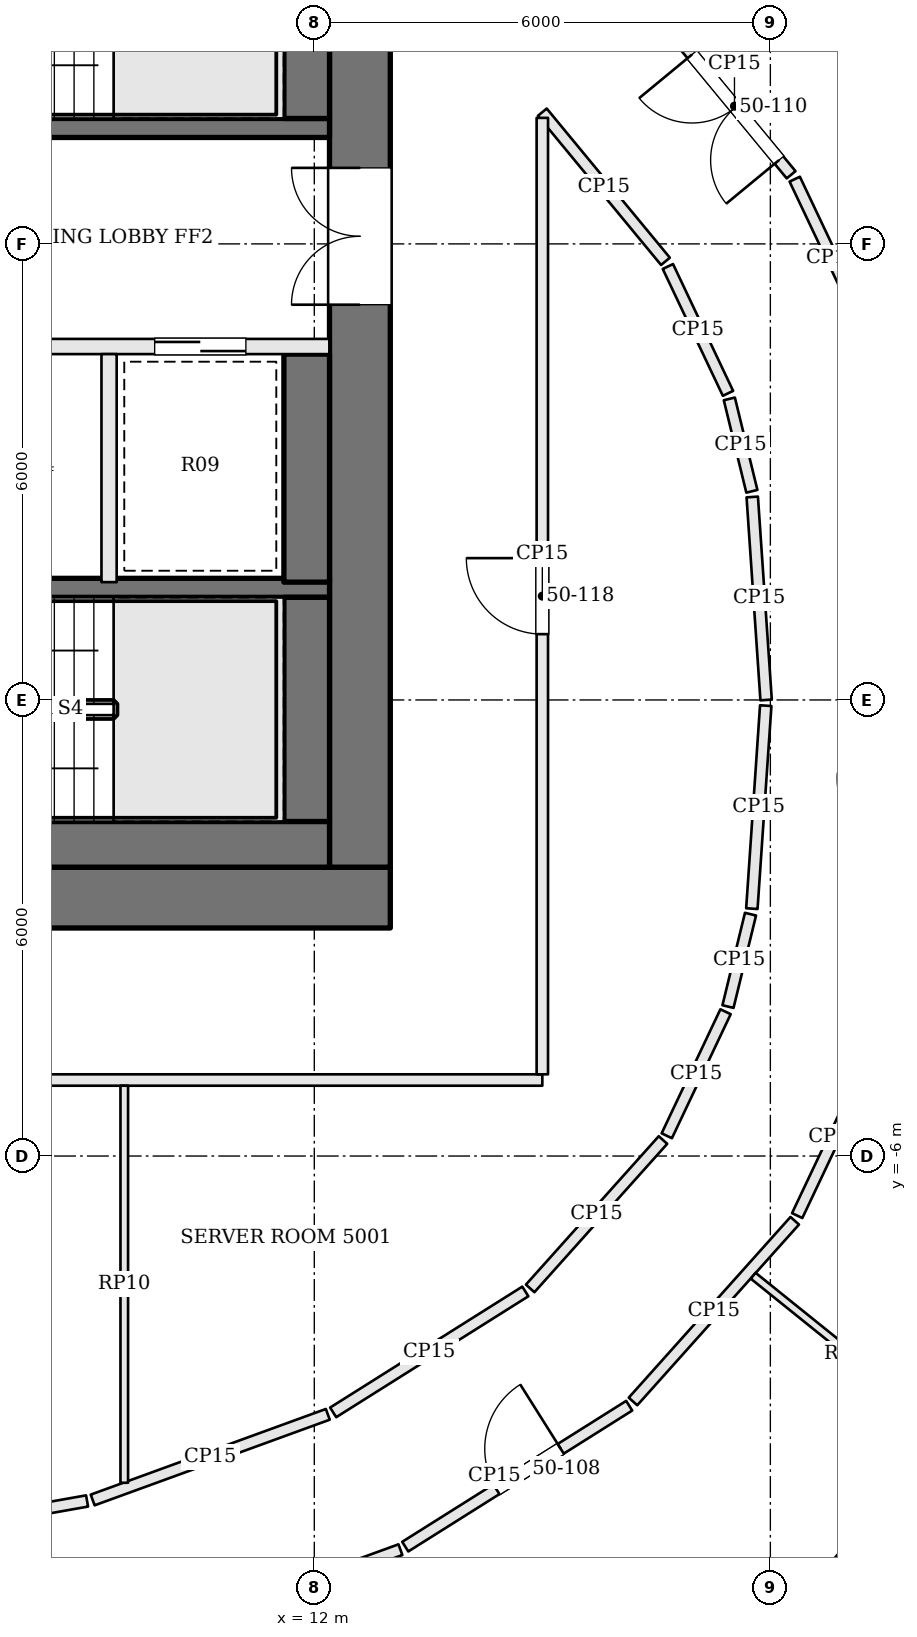
"""IFC4 building model, lengths in metres.
Left out: names, types, materials, properties, quantities, classifications, styles, units other than length and angle.
Written with IfcOpenShell. Run it as: python <this file> out.ifc"""

import sys

from ifc_helpers import new_model, si_unit, direction, frame, frame_2d, origin, place, context, subcontext, project, spatial, rectangle, extrude, element, fill, save


model = new_model("IFC4")
c1 = context("Model", 3, precision=1e-05, world=origin(), true_north=direction((0.0, 1.0)))
c2 = subcontext(c1, "Body", "Model", "MODEL_VIEW")
j1 = project(units=[si_unit("LENGTHUNIT", "METRE"), si_unit("PLANEANGLEUNIT", "RADIAN")], contexts=[c1])
p1 = place(None, origin())
s1 = spatial("IfcSite", under=j1, at=p1, CompositionType="ELEMENT")
p2 = place(p1, origin())
s2 = spatial("IfcBuilding", under=s1, at=p2, CompositionType="ELEMENT")
p3 = place(p2, frame((0.0, 0.0, 205.2)))
s3 = spatial("IfcBuildingStorey", under=s2, at=p3, CompositionType="ELEMENT", Elevation=205.2)
p4 = place(p3, frame((-13.0, -2.6, 0.0), z_axis=(0.0, 0.0, 1.0), x_axis=(1.0, 0.0, 0.0)))
e1 = element("IfcWall", 1, at=p4, inside=s3, PredefinedType="SHEAR", context=c2, shape_type="SweptSolid", body=[
    extrude(rectangle(XDim=26.0, YDim=0.8, at=frame_2d((13.0, 0.0))), origin(), (0.0, 0.0, 1.0), 3.9),
])
p5 = place(p4, frame((8.925, 0.0, 0.0)))
e2 = element("IfcOpeningElement", 2, at=p5, cuts=e1, PredefinedType="OPENING", context=c2, shape_type="SweptSolid", body=[
    extrude(rectangle(XDim=0.9, YDim=2.1, at=frame_2d((0.45, 1.05))), frame((0.0, 0.41, 0.0), z_axis=(0.0, -1.0, 0.0), x_axis=(1.0, 0.0, 0.0)), (0.0, 0.0, 1.0), 0.82),
])
p6 = place(p4, frame((11.475, 0.0, 0.0)))
e3 = element("IfcOpeningElement", 3, at=p6, cuts=e1, PredefinedType="OPENING", context=c2, shape_type="SweptSolid", body=[
    extrude(rectangle(XDim=0.9, YDim=2.1, at=frame_2d((0.45, 1.05))), frame((0.0, 0.41, 0.0), z_axis=(0.0, -1.0, 0.0), x_axis=(1.0, 0.0, 0.0)), (0.0, 0.0, 1.0), 0.82),
])
p7 = place(p4, frame((13.6, 0.0, 0.0)))
e4 = element("IfcOpeningElement", 4, at=p7, cuts=e1, PredefinedType="OPENING", context=c2, shape_type="SweptSolid", body=[
    extrude(rectangle(XDim=1.0, YDim=2.1, at=frame_2d((0.5, 1.05))), frame((0.0, 0.41, 0.0), z_axis=(0.0, -1.0, 0.0), x_axis=(1.0, 0.0, 0.0)), (0.0, 0.0, 1.0), 0.82),
])
p8 = place(p4, frame((15.95, 0.0, 0.0)))
e5 = element("IfcOpeningElement", 5, at=p8, cuts=e1, PredefinedType="OPENING", context=c2, shape_type="SweptSolid", body=[
    extrude(rectangle(XDim=1.0, YDim=2.1, at=frame_2d((0.5, 1.05))), frame((0.0, 0.41, 0.0), z_axis=(0.0, -1.0, 0.0), x_axis=(1.0, 0.0, 0.0)), (0.0, 0.0, 1.0), 0.82),
])
p9 = place(p3, frame((12.6, -2.2, 0.0), z_axis=(0.0, 0.0, 1.0), x_axis=(0.0, 1.0, 0.0)))
e6 = element("IfcWall", 6, at=p9, inside=s3, PredefinedType="SHEAR", context=c2, shape_type="SweptSolid", body=[
    extrude(rectangle(XDim=13.4, YDim=0.8, at=frame_2d((6.7, 0.0))), origin(), (0.0, 0.0, 1.0), 3.9),
])
p10 = place(p9, frame((7.4, 0.0, 0.0)))
e7 = element("IfcOpeningElement", 7, at=p10, cuts=e6, PredefinedType="OPENING", context=c2, shape_type="SweptSolid", body=[
    extrude(rectangle(XDim=1.8, YDim=2.1, at=frame_2d((0.9, 1.05))), frame((0.0, 0.41, 0.0), z_axis=(0.0, -1.0, 0.0), x_axis=(1.0, 0.0, 0.0)), (0.0, 0.0, 1.0), 0.82),
])
p11 = place(p3, frame((12.2, 7.525, 0.0), z_axis=(0.0, 0.0, 1.0), x_axis=(-1.0, 0.0, 0.0)))
e8 = element("IfcWall", 8, at=p11, inside=s3, PredefinedType="SOLIDWALL", context=c2, shape_type="SweptSolid", body=[
    extrude(rectangle(XDim=7.1, YDim=0.25, at=frame_2d((3.55, 0.0))), origin(), (0.0, 0.0, 1.0), 3.7),
])
p12 = place(p11, frame((5.8, 0.0, 0.0)))
e9 = element("IfcOpeningElement", 9, at=p12, cuts=e8, PredefinedType="OPENING", context=c2, shape_type="SweptSolid", body=[
    extrude(rectangle(XDim=1.2, YDim=2.1, at=frame_2d((0.6, 1.05))), frame((0.0, 0.135, 0.0), z_axis=(0.0, -1.0, 0.0), x_axis=(1.0, 0.0, 0.0)), (0.0, 0.0, 1.0), 0.27),
])
p13 = place(p3, frame((12.2, 4.65, 0.0), z_axis=(0.0, 0.0, 1.0), x_axis=(-1.0, 0.0, 0.0)))
e10 = element("IfcWall", 10, at=p13, inside=s3, PredefinedType="SOLIDWALL", context=c2, shape_type="SweptSolid", body=[
    extrude(rectangle(XDim=7.1, YDim=0.2, at=frame_2d((3.55, 0.0))), origin(), (0.0, 0.0, 1.0), 3.7),
])
p14 = place(p13, frame((4.4, 0.0, 0.0)))
e11 = element("IfcOpeningElement", 11, at=p14, cuts=e10, PredefinedType="OPENING", context=c2, shape_type="SweptSolid", body=[
    extrude(rectangle(XDim=1.2, YDim=2.1, at=frame_2d((0.6, 1.05))), frame((0.0, 0.11, 0.0), z_axis=(0.0, -1.0, 0.0), x_axis=(1.0, 0.0, 0.0)), (0.0, 0.0, 1.0), 0.22),
])
p15 = place(p13, frame((1.1, 0.0, 0.0)))
e12 = element("IfcOpeningElement", 12, at=p15, cuts=e10, PredefinedType="OPENING", context=c2, shape_type="SweptSolid", body=[
    extrude(rectangle(XDim=1.2, YDim=2.1, at=frame_2d((0.6, 1.05))), frame((0.0, 0.11, 0.0), z_axis=(0.0, -1.0, 0.0), x_axis=(1.0, 0.0, 0.0)), (0.0, 0.0, 1.0), 0.22),
])
p16 = place(p3, frame((12.2, 1.475, 0.0), z_axis=(0.0, 0.0, 1.0), x_axis=(-1.0, 0.0, 0.0)))
e13 = element("IfcWall", 13, at=p16, inside=s3, PredefinedType="SOLIDWALL", context=c2, shape_type="SweptSolid", body=[
    extrude(rectangle(XDim=7.1, YDim=0.25, at=frame_2d((3.55, 0.0))), origin(), (0.0, 0.0, 1.0), 3.7),
])
p17 = place(p16, frame((5.8, 0.0, 0.0)))
e14 = element("IfcOpeningElement", 14, at=p17, cuts=e13, PredefinedType="OPENING", context=c2, shape_type="SweptSolid", body=[
    extrude(rectangle(XDim=1.2, YDim=2.1, at=frame_2d((0.6, 1.05))), frame((0.0, 0.135, 0.0), z_axis=(0.0, -1.0, 0.0), x_axis=(1.0, 0.0, 0.0)), (0.0, 0.0, 1.0), 0.27),
])
p18 = place(p3, frame((9.3, 4.55, 0.0), z_axis=(0.0, 0.0, 1.0), x_axis=(0.0, -1.0, 0.0)))
e15 = element("IfcWall", 15, at=p18, inside=s3, PredefinedType="SOLIDWALL", context=c2, shape_type="SweptSolid", body=[
    extrude(rectangle(XDim=3.0, YDim=0.2, at=frame_2d((1.5, 0.0))), origin(), (0.0, 0.0, 1.0), 3.7),
])
p19 = place(p3, frame((11.9, 10.6, 0.0), z_axis=(0.0, 0.0, 1.0), x_axis=(0.0, -1.0, 0.0)))
e16 = element("IfcWall", 16, at=p19, inside=s3, PredefinedType="SOLIDWALL", context=c2, shape_type="SweptSolid", body=[
    extrude(rectangle(XDim=2.95, YDim=0.6, at=frame_2d((1.475, 0.0))), origin(), (0.0, 0.0, 1.0), 3.7),
])
p20 = place(p3, frame((11.9, 4.55, 0.0), z_axis=(0.0, 0.0, 1.0), x_axis=(0.0, -1.0, 0.0)))
e17 = element("IfcWall", 17, at=p20, inside=s3, PredefinedType="SOLIDWALL", context=c2, shape_type="SweptSolid", body=[
    extrude(rectangle(XDim=3.0, YDim=0.6, at=frame_2d((1.5, 0.0))), origin(), (0.0, 0.0, 1.0), 3.7),
])
p21 = place(p3, frame((11.9, 1.35, 0.0), z_axis=(0.0, 0.0, 1.0), x_axis=(0.0, -1.0, 0.0)))
e18 = element("IfcWall", 18, at=p21, inside=s3, PredefinedType="SOLIDWALL", context=c2, shape_type="SweptSolid", body=[
    extrude(rectangle(XDim=2.95, YDim=0.6, at=frame_2d((1.475, 0.0))), origin(), (0.0, 0.0, 1.0), 3.7),
])
p22 = place(p3, frame((12.2, -1.9, 0.0), z_axis=(0.0, 0.0, 1.0), x_axis=(-1.0, 0.0, 0.0)))
e19 = element("IfcWall", 19, at=p22, inside=s3, PredefinedType="SOLIDWALL", context=c2, shape_type="SweptSolid", body=[
    extrude(rectangle(XDim=7.1, YDim=0.6, at=frame_2d((3.55, 0.0))), origin(), (0.0, 0.0, 1.0), 3.7),
])
p23 = place(p3, frame((9.676, -12.438, 0.0), z_axis=(0.0, 0.0, 1.0), x_axis=(0.939640289748, 0.342163887461, 0.0)))
e20 = element("IfcWall", 20, at=p23, inside=s3, PredefinedType="PARTITIONING", context=c2, shape_type="SweptSolid", body=[
    extrude(rectangle(XDim=3.68, YDim=0.15, at=frame_2d((1.84, 0.0))), origin(), (0.0, 0.0, 1.0), 3.084),
])
p24 = place(p3, frame((13.197, -11.139, 0.0), z_axis=(0.0, 0.0, 1.0), x_axis=(0.846390903833, 0.532562144644, 0.0)))
e21 = element("IfcWall", 21, at=p24, inside=s3, PredefinedType="PARTITIONING", context=c2, shape_type="SweptSolid", body=[
    extrude(rectangle(XDim=3.481, YDim=0.15, at=frame_2d((1.741, 0.0))), origin(), (0.0, 0.0, 1.0), 3.084),
])
p25 = place(p24, frame((1.417, 0.0, 0.0)))
e22 = element("IfcOpeningElement", 22, at=p25, cuts=e21, PredefinedType="OPENING", context=c2, shape_type="SweptSolid", body=[
    extrude(rectangle(XDim=1.0, YDim=2.4, at=frame_2d((0.5, 1.2))), frame((0.0, 0.085, 0.0), z_axis=(0.0, -1.0, 0.0), x_axis=(1.0, 0.0, 0.0)), (0.0, 0.0, 1.0), 0.17),
])
p26 = place(p3, frame((16.193, -9.229, 0.0), z_axis=(0.0, 0.0, 1.0), x_axis=(0.666882089048, 0.745163256815, 0.0)))
e23 = element("IfcWall", 23, at=p26, inside=s3, PredefinedType="PARTITIONING", context=c2, shape_type="SweptSolid", body=[
    extrude(rectangle(XDim=3.19, YDim=0.15, at=frame_2d((1.595, 0.0))), origin(), (0.0, 0.0, 1.0), 3.084),
])
for number, where, z_axis, x_axis in (
    (24, (18.353, -6.784, 0.0), (0.0, 0.0, 1.0), (0.428, 0.904, 0.0)),
    (25, (19.305, 4.773, 0.0), (0.0, 0.0, 1.0), (-0.428, 0.904, 0.0)),
):
    element("IfcWall", number, at=place(p3, frame(where, z_axis=z_axis, x_axis=x_axis)), inside=s3, PredefinedType="PARTITIONING", context=c2, shape_type="SweptSolid", body=[
        extrude(rectangle(XDim=2.3, YDim=0.15, at=frame_2d((1.15, 0.0))), origin(), (0.0, 0.0, 1.0), 3.084),
    ])
p27 = place(p3, frame((18.273, 6.909, 0.0), z_axis=(0.0, 0.0, 1.0), x_axis=(-0.63653648943, 0.771246586783, 0.0)))
e26 = element("IfcWall", 26, at=p27, inside=s3, PredefinedType="PARTITIONING", context=c2, shape_type="SweptSolid", body=[
    extrude(rectangle(XDim=2.342, YDim=0.15, at=frame_2d((1.171, 0.0))), origin(), (0.0, 0.0, 1.0), 3.084),
])
p28 = place(p27, frame((0.25, 0.0, 0.0)))
e27 = element("IfcOpeningElement", 27, at=p28, cuts=e26, PredefinedType="OPENING", context=c2, shape_type="SweptSolid", body=[
    extrude(rectangle(XDim=1.8, YDim=2.1, at=frame_2d((0.9, 1.05))), frame((0.0, 0.085, 0.0), z_axis=(0.0, -1.0, 0.0), x_axis=(1.0, 0.0, 0.0)), (0.0, 0.0, 1.0), 0.17),
])
p29 = place(p3, frame((15.0, 7.733, 0.0), z_axis=(0.0, 0.0, 1.0), x_axis=(0.636601263488, -0.771193121938, 0.0)))
e28 = element("IfcWall", 28, at=p29, inside=s3, PredefinedType="PARTITIONING", context=c2, shape_type="SweptSolid", body=[
    extrude(rectangle(XDim=2.545, YDim=0.15, at=frame_2d((1.272, 0.0))), origin(), (0.0, 0.0, 1.0), 3.084),
])
p30 = place(p3, frame((16.652, 5.702, 0.0), z_axis=(0.0, 0.0, 1.0), x_axis=(0.428126129773, -0.903718992279, 0.0)))
e29 = element("IfcWall", 29, at=p30, inside=s3, PredefinedType="PARTITIONING", context=c2, shape_type="SweptSolid", body=[
    extrude(rectangle(XDim=1.846, YDim=0.15, at=frame_2d((0.923, 0.0))), origin(), (0.0, 0.0, 1.0), 3.084),
])
p31 = place(p3, frame((17.46, 3.961, 0.0), z_axis=(0.0, 0.0, 1.0), x_axis=(0.236655249498, -0.971593687137, 0.0)))
e30 = element("IfcWall", 30, at=p31, inside=s3, PredefinedType="PARTITIONING", context=c2, shape_type="SweptSolid", body=[
    extrude(rectangle(XDim=1.251, YDim=0.15, at=frame_2d((0.626, 0.0))), origin(), (0.0, 0.0, 1.0), 3.084),
])
p32 = place(p3, frame((17.762, 2.67, 0.0), z_axis=(0.0, 0.0, 1.0), x_axis=(0.068135311644, -0.997676089373, 0.0)))
e31 = element("IfcWall", 31, at=p32, inside=s3, PredefinedType="PARTITIONING", context=c2, shape_type="SweptSolid", body=[
    extrude(rectangle(XDim=2.677, YDim=0.15, at=frame_2d((1.338, 0.0))), origin(), (0.0, 0.0, 1.0), 3.084),
])
p33 = place(p3, frame((17.939, -0.075, 0.0), z_axis=(0.0, 0.0, 1.0), x_axis=(-0.068226099283, -0.99766988497, 0.0)))
e32 = element("IfcWall", 32, at=p33, inside=s3, PredefinedType="PARTITIONING", context=c2, shape_type="SweptSolid", body=[
    extrude(rectangle(XDim=2.677, YDim=0.15, at=frame_2d((1.338, 0.0))), origin(), (0.0, 0.0, 1.0), 3.084),
])
p34 = place(p3, frame((17.739, -2.818, 0.0), z_axis=(0.0, 0.0, 1.0), x_axis=(-0.236884307907, -0.971537865792, 0.0)))
e33 = element("IfcWall", 33, at=p34, inside=s3, PredefinedType="PARTITIONING", context=c2, shape_type="SweptSolid", body=[
    extrude(rectangle(XDim=1.251, YDim=0.15, at=frame_2d((0.625, 0.0))), origin(), (0.0, 0.0, 1.0), 3.084),
])
p35 = place(p3, frame((17.41, -4.102, 0.0), z_axis=(0.0, 0.0, 1.0), x_axis=(-0.428074720318, -0.903743345107, 0.0)))
e34 = element("IfcWall", 34, at=p35, inside=s3, PredefinedType="PARTITIONING", context=c2, shape_type="SweptSolid", body=[
    extrude(rectangle(XDim=1.806, YDim=0.15, at=frame_2d((0.903, 0.0))), origin(), (0.0, 0.0, 1.0), 3.084),
])
p36 = place(p3, frame((16.587, -5.789, 0.0), z_axis=(0.0, 0.0, 1.0), x_axis=(-0.666887460656, -0.745158449472, 0.0)))
e35 = element("IfcWall", 35, at=p36, inside=s3, PredefinedType="PARTITIONING", context=c2, shape_type="SweptSolid", body=[
    extrude(rectangle(XDim=2.62, YDim=0.15, at=frame_2d((1.31, 0.0))), origin(), (0.0, 0.0, 1.0), 3.084),
])
p37 = place(p3, frame((14.777, -7.781, 0.0), z_axis=(0.0, 0.0, 1.0), x_axis=(-0.846359741043, -0.532611667862, 0.0)))
e36 = element("IfcWall", 36, at=p37, inside=s3, PredefinedType="PARTITIONING", context=c2, shape_type="SweptSolid", body=[
    extrude(rectangle(XDim=2.987, YDim=0.15, at=frame_2d((1.494, 0.0))), origin(), (0.0, 0.0, 1.0), 3.084),
])
p38 = place(p3, frame((12.178, -9.398, 0.0), z_axis=(0.0, 0.0, 1.0), x_axis=(-0.939609240084, -0.342249143093, 0.0)))
e37 = element("IfcWall", 37, at=p38, inside=s3, PredefinedType="PARTITIONING", context=c2, shape_type="SweptSolid", body=[
    extrude(rectangle(XDim=3.292, YDim=0.15, at=frame_2d((1.646, 0.0))), origin(), (0.0, 0.0, 1.0), 3.084),
])
p39 = place(p3, frame((9.01, -10.538, 0.0), z_axis=(0.0, 0.0, 1.0), x_axis=(-0.984645638575, -0.174565077936, 0.0)))
e38 = element("IfcWall", 38, at=p39, inside=s3, PredefinedType="PARTITIONING", context=c2, shape_type="SweptSolid", body=[
    extrude(rectangle(XDim=4.358, YDim=0.15, at=frame_2d((2.179, 0.0))), origin(), (0.0, 0.0, 1.0), 3.084),
])
p40 = place(p3, frame((-14.925, -5.0, 0.0), z_axis=(0.0, 0.0, 1.0), x_axis=(1.0, 0.0, 0.0)))
e39 = element("IfcWall", 39, at=p40, inside=s3, PredefinedType="PARTITIONING", context=c2, shape_type="SweptSolid", body=[
    extrude(rectangle(XDim=29.925, YDim=0.15, at=frame_2d((14.962, 0.0))), origin(), (0.0, 0.0, 1.0), 3.084),
])
p41 = place(p40, frame((14.025, 0.0, 0.0)))
e40 = element("IfcOpeningElement", 40, at=p41, cuts=e39, PredefinedType="OPENING", context=c2, shape_type="SweptSolid", body=[
    extrude(rectangle(XDim=1.8, YDim=2.1, at=frame_2d((0.9, 1.05))), frame((0.0, 0.085, 0.0), z_axis=(0.0, -1.0, 0.0), x_axis=(1.0, 0.0, 0.0)), (0.0, 0.0, 1.0), 0.17),
])
p42 = place(p3, frame((15.0, -4.925, 0.0), z_axis=(0.0, 0.0, 1.0), x_axis=(0.0, 1.0, 0.0)))
e41 = element("IfcWall", 41, at=p42, inside=s3, PredefinedType="PARTITIONING", context=c2, shape_type="SweptSolid", body=[
    extrude(rectangle(XDim=12.583, YDim=0.15, at=frame_2d((6.292, 0.0))), origin(), (0.0, 0.0, 1.0), 3.084),
])
p43 = place(p42, frame((5.791, 0.0, 0.0)))
e42 = element("IfcOpeningElement", 42, at=p43, cuts=e41, PredefinedType="OPENING", context=c2, shape_type="SweptSolid", body=[
    extrude(rectangle(XDim=1.0, YDim=2.1, at=frame_2d((0.5, 1.05))), frame((0.0, 0.085, 0.0), z_axis=(0.0, -1.0, 0.0), x_axis=(1.0, 0.0, 0.0)), (0.0, 0.0, 1.0), 0.17),
])
p44 = place(p3, frame((20.45, -9.571, 0.0), z_axis=(0.0, 0.0, 1.0), x_axis=(-0.666910888996, -0.745137481368, 0.0)))
e43 = element("IfcWall", 43, at=p44, inside=s3, PredefinedType="PARTITIONING", context=c2, shape_type="SweptSolid", body=[
    extrude(rectangle(XDim=3.136, YDim=0.1, at=frame_2d((1.568, 0.0))), origin(), (0.0, 0.0, 1.0), 3.084),
])
p45 = place(p3, frame((17.774, -7.575, 0.0), z_axis=(0.0, 0.0, 1.0), x_axis=(0.779013458918, -0.627007201573, 0.0)))
e44 = element("IfcWall", 44, at=p45, inside=s3, PredefinedType="PARTITIONING", context=c2, shape_type="SweptSolid", body=[
    extrude(rectangle(XDim=3.28, YDim=0.1, at=frame_2d((1.64, 0.0))), origin(), (0.0, 0.0, 1.0), 3.084),
])
p46 = place(p3, frame((9.5, -10.299, 0.0), z_axis=(0.0, 0.0, 1.0), x_axis=(0.0, 1.0, 0.0)))
e45 = element("IfcWall", 45, at=p46, inside=s3, PredefinedType="PARTITIONING", context=c2, shape_type="SweptSolid", body=[
    extrude(rectangle(XDim=5.224, YDim=0.1, at=frame_2d((2.612, 0.0))), origin(), (0.0, 0.0, 1.0), 3.084),
])
p47 = place(p10, origin())
e46 = element("IfcDoor", 46, at=p47, inside=s3, OperationType="DOUBLE_DOOR_SINGLE_SWING", PredefinedType="DOOR", context=c2, shape_type="SweptSolid", body=[
    extrude(rectangle(XDim=1.8, YDim=2.1, at=frame_2d((0.9, 1.05))), frame((0.0, 0.025, 0.0), z_axis=(0.0, -1.0, 0.0), x_axis=(1.0, 0.0, 0.0)), (0.0, 0.0, 1.0), 0.05),
])
fill(e7, e46)
p48 = place(p15, origin())
e47 = element("IfcDoor", 47, at=p48, inside=s3, OperationType="SLIDING_TO_RIGHT", PredefinedType="DOOR", context=c2, shape_type="SweptSolid", body=[
    extrude(rectangle(XDim=1.2, YDim=2.1, at=frame_2d((0.6, 1.05))), frame((0.0, 0.025, 0.0), z_axis=(0.0, -1.0, 0.0), x_axis=(1.0, 0.0, 0.0)), (0.0, 0.0, 1.0), 0.05),
])
fill(e12, e47)
p49 = place(p25, origin())
e48 = element("IfcDoor", 48, at=p49, inside=s3, OperationType="SINGLE_SWING_RIGHT", PredefinedType="DOOR", context=c2, shape_type="SweptSolid", body=[
    extrude(rectangle(XDim=1.0, YDim=2.4, at=frame_2d((0.5, 1.2))), frame((0.0, 0.025, 0.0), z_axis=(0.0, -1.0, 0.0), x_axis=(1.0, 0.0, 0.0)), (0.0, 0.0, 1.0), 0.05),
])
fill(e22, e48)
p50 = place(p28, origin())
e49 = element("IfcDoor", 49, at=p50, inside=s3, OperationType="DOUBLE_DOOR_SINGLE_SWING", PredefinedType="DOOR", context=c2, shape_type="SweptSolid", body=[
    extrude(rectangle(XDim=1.8, YDim=2.1, at=frame_2d((0.9, 1.05))), frame((0.0, 0.025, 0.0), z_axis=(0.0, -1.0, 0.0), x_axis=(1.0, 0.0, 0.0)), (0.0, 0.0, 1.0), 0.05),
])
fill(e27, e49)
p51 = place(p43, origin())
e50 = element("IfcDoor", 50, at=p51, inside=s3, OperationType="SINGLE_SWING_RIGHT", PredefinedType="DOOR", context=c2, shape_type="SweptSolid", body=[
    extrude(rectangle(XDim=1.0, YDim=2.1, at=frame_2d((0.5, 1.05))), frame((0.0, 0.025, 0.0), z_axis=(0.0, -1.0, 0.0), x_axis=(1.0, 0.0, 0.0)), (0.0, 0.0, 1.0), 0.05),
])
fill(e42, e50)
save(model, sys.argv[1])
